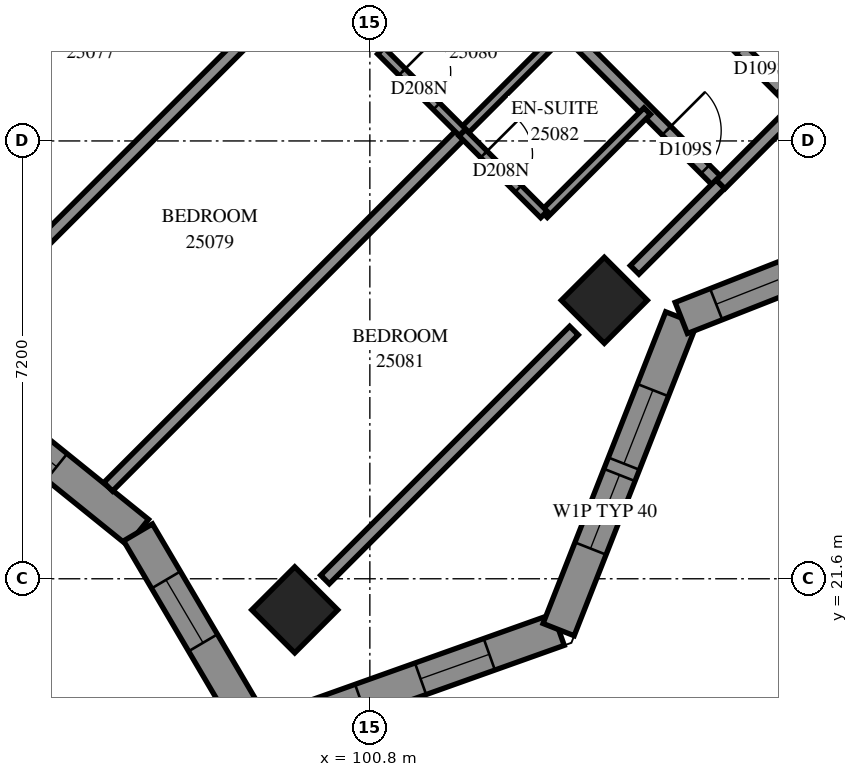
"""IFC4 building model, lengths in metres.
Left out: names, types, materials, properties, quantities, classifications, styles, units other than length and angle.
Written with IfcOpenShell. Run it as: python <this file> out.ifc"""

import sys

from ifc_helpers import new_model, si_unit, direction, frame, frame_2d, origin, origin_2d, place, context, subcontext, project, spatial, polyline, rectangle, outline, extrude, element, fill, save


model = new_model("IFC4")
c1 = context("Model", 3, precision=1e-05, world=origin(), true_north=direction((0.0, 1.0)))
c2 = subcontext(c1, "Body", "Model", "MODEL_VIEW")
j1 = project(units=[si_unit("LENGTHUNIT", "METRE"), si_unit("PLANEANGLEUNIT", "RADIAN")], contexts=[c1])
p1 = place(None, origin())
s1 = spatial("IfcSite", under=j1, at=p1, CompositionType="ELEMENT")
p2 = place(p1, origin())
s2 = spatial("IfcBuilding", under=s1, at=p2, CompositionType="ELEMENT")
p3 = place(p2, frame((0.0, 0.0, 94.8)))
s3 = spatial("IfcBuildingStorey", under=s2, at=p3, CompositionType="ELEMENT", Elevation=94.8)
for number, where, z_axis, x_axis in (
    (1, (104.656, 26.18, 0.0), (0.0, 0.0, 1.0), (0.707, -0.707, 0.0)),
    (2, (99.565, 21.088, 0.0), (0.0, 0.0, 1.0), (0.707, -0.707, 0.0)),
):
    element("IfcColumn", number, at=place(p3, frame(where, z_axis=z_axis, x_axis=x_axis)), inside=s3, PredefinedType="COLUMN", context=c2, shape_type="SweptSolid", body=[
        extrude(rectangle(XDim=1.0, YDim=1.0, at=origin_2d()), origin(), (0.0, 0.0, 1.0), 3.1),
    ])
p4 = place(p3, frame((98.965, 19.005, 0.0), z_axis=(0.0, 0.0, 1.0), x_axis=(0.9420323594, 0.3355220319, 0.0)))
e3 = element("IfcWall", 3, at=p4, inside=s3, PredefinedType="SOLIDWALL", context=c2, shape_type="SweptSolid", body=[
    extrude(outline(polyline([(-0.227, -0.275), (5.369, -0.275), (5.119, 0.275), (0.227, 0.275), (-0.227, -0.275)])), origin(), (0.0, 0.0, 1.0), 3.1),
])
p5 = place(p4, frame((0.588, 0.0, 0.5)))
e4 = element("IfcOpeningElement", 4, at=p5, cuts=e3, PredefinedType="OPENING", context=c2, shape_type="SweptSolid", body=[
    extrude(rectangle(XDim=1.2, YDim=2.45, at=frame_2d((0.6, 1.225))), frame((0.0, 0.285, 0.0), z_axis=(0.0, -1.0, 0.0), x_axis=(1.0, 0.0, 0.0)), (0.0, 0.0, 1.0), 0.57),
])
p6 = place(p4, frame((2.834, 0.0, 0.5)))
e5 = element("IfcOpeningElement", 5, at=p6, cuts=e3, PredefinedType="OPENING", context=c2, shape_type="SweptSolid", body=[
    extrude(rectangle(XDim=1.2, YDim=2.45, at=frame_2d((0.6, 1.225))), frame((0.0, 0.285, 0.0), z_axis=(0.0, -1.0, 0.0), x_axis=(1.0, 0.0, 0.0)), (0.0, 0.0, 1.0), 0.57),
])
p7 = place(p3, frame((103.904, 20.764, 0.0), z_axis=(0.0, 0.0, 1.0), x_axis=(0.3662073004, 0.930533295, 0.0)))
e6 = element("IfcWall", 6, at=p7, inside=s3, PredefinedType="SOLIDWALL", context=c2, shape_type="SweptSolid", body=[
    extrude(outline(polyline([(-0.125, -0.275), (5.388, -0.275), (5.628, 0.275), (0.125, 0.275), (-0.125, -0.275)])), origin(), (0.0, 0.0, 1.0), 3.1),
])
p8 = place(p7, frame((1.433, 0.0, 0.5)))
e7 = element("IfcOpeningElement", 7, at=p8, cuts=e6, PredefinedType="OPENING", context=c2, shape_type="SweptSolid", body=[
    extrude(rectangle(XDim=1.3, YDim=2.45, at=frame_2d((0.65, 1.225))), frame((0.0, 0.285, 0.0), z_axis=(0.0, -1.0, 0.0), x_axis=(1.0, 0.0, 0.0)), (0.0, 0.0, 1.0), 0.57),
])
p9 = place(p7, frame((2.933, 0.0, 0.5)))
e8 = element("IfcOpeningElement", 8, at=p9, cuts=e6, PredefinedType="OPENING", context=c2, shape_type="SweptSolid", body=[
    extrude(rectangle(XDim=1.3, YDim=2.45, at=frame_2d((0.65, 1.225))), frame((0.0, 0.285, 0.0), z_axis=(0.0, -1.0, 0.0), x_axis=(1.0, 0.0, 0.0)), (0.0, 0.0, 1.0), 0.57),
])
p10 = place(p3, frame((105.921, 25.889, 0.0), z_axis=(0.0, 0.0, 1.0), x_axis=(0.9305394819, 0.3661915791, 0.0)))
e9 = element("IfcWall", 9, at=p10, inside=s3, PredefinedType="SOLIDWALL", context=c2, shape_type="SweptSolid", body=[
    extrude(outline(polyline([(0.12, -0.275), (5.633, -0.275), (5.383, 0.275), (-0.12, 0.275), (0.12, -0.275)])), origin(), (0.0, 0.0, 1.0), 3.1),
])
p11 = place(p10, frame((0.617, 0.0, 0.5)))
e10 = element("IfcOpeningElement", 10, at=p11, cuts=e9, PredefinedType="OPENING", context=c2, shape_type="SweptSolid", body=[
    extrude(rectangle(XDim=1.2, YDim=2.45, at=frame_2d((0.6, 1.225))), frame((0.0, 0.285, 0.0), z_axis=(0.0, -1.0, 0.0), x_axis=(1.0, 0.0, 0.0)), (0.0, 0.0, 1.0), 0.57),
])
p12 = place(p10, frame((3.108, 0.0, 0.5)))
e11 = element("IfcOpeningElement", 11, at=p12, cuts=e9, PredefinedType="OPENING", context=c2, shape_type="SweptSolid", body=[
    extrude(rectangle(XDim=1.2, YDim=2.45, at=frame_2d((0.6, 1.225))), frame((0.0, 0.285, 0.0), z_axis=(0.0, -1.0, 0.0), x_axis=(1.0, 0.0, 0.0)), (0.0, 0.0, 1.0), 0.57),
])
p13 = place(p3, frame((93.885, 24.867, 0.0), z_axis=(0.0, 0.0, 1.0), x_axis=(0.7781698309, -0.6280539103, 0.0)))
e12 = element("IfcWall", 12, at=p13, inside=s3, PredefinedType="SOLIDWALL", context=c2, shape_type="SweptSolid", body=[
    extrude(outline(polyline([(-0.029, -0.275), (3.937, -0.275), (4.037, 0.275), (0.029, 0.275), (-0.029, -0.275)])), origin(), (0.0, 0.0, 1.0), 3.1),
])
p14 = place(p13, frame((1.067, 0.0, 0.5)))
e13 = element("IfcOpeningElement", 13, at=p14, cuts=e12, PredefinedType="OPENING", context=c2, shape_type="SweptSolid", body=[
    extrude(rectangle(XDim=1.2, YDim=2.45, at=frame_2d((0.6, 1.225))), frame((0.0, 0.285, 0.0), z_axis=(0.0, -1.0, 0.0), x_axis=(1.0, 0.0, 0.0)), (0.0, 0.0, 1.0), 0.57),
])
p15 = place(p3, frame((96.988, 22.363, 0.0), z_axis=(0.0, 0.0, 1.0), x_axis=(0.507326266, -0.86175406, 0.0)))
e14 = element("IfcWall", 14, at=p15, inside=s3, PredefinedType="SOLIDWALL", context=c2, shape_type="SweptSolid", body=[
    extrude(outline(polyline([(0.05, -0.275), (4.124, -0.275), (3.67, 0.275), (-0.05, 0.275), (0.05, -0.275)])), origin(), (0.0, 0.0, 1.0), 3.1),
])
p16 = place(p15, frame((0.907, 0.0, 0.5)))
e15 = element("IfcOpeningElement", 15, at=p16, cuts=e14, PredefinedType="OPENING", context=c2, shape_type="SweptSolid", body=[
    extrude(rectangle(XDim=1.2, YDim=2.45, at=frame_2d((0.6, 1.225))), frame((0.0, 0.285, 0.0), z_axis=(0.0, -1.0, 0.0), x_axis=(1.0, 0.0, 0.0)), (0.0, 0.0, 1.0), 0.57),
])
p17 = place(p3, frame((93.339, 41.309, 0.0), z_axis=(0.0, 0.0, 1.0), x_axis=(0.7071067812, -0.7071067812, 0.0)))
e16 = element("IfcWall", 16, at=p17, inside=s3, PredefinedType="PARTITIONING", context=c2, shape_type="SweptSolid", body=[
    extrude(rectangle(XDim=18.702, YDim=0.2, at=frame_2d((9.351, 0.0))), origin(), (0.0, 0.0, 1.0), 3.1),
])
p18 = place(p17, frame((3.05, 0.0, 0.0)))
e17 = element("IfcOpeningElement", 17, at=p18, cuts=e16, PredefinedType="OPENING", context=c2, shape_type="SweptSolid", body=[
    extrude(rectangle(XDim=0.9, YDim=2.1, at=frame_2d((0.45, 1.05))), frame((0.0, 0.11, 0.0), z_axis=(0.0, -1.0, 0.0), x_axis=(1.0, 0.0, 0.0)), (0.0, 0.0, 1.0), 0.22),
])
p19 = place(p17, frame((4.7, 0.0, 0.0)))
e18 = element("IfcOpeningElement", 18, at=p19, cuts=e16, PredefinedType="OPENING", context=c2, shape_type="SweptSolid", body=[
    extrude(rectangle(XDim=0.9, YDim=2.1, at=frame_2d((0.45, 1.05))), frame((0.0, 0.11, 0.0), z_axis=(0.0, -1.0, 0.0), x_axis=(1.0, 0.0, 0.0)), (0.0, 0.0, 1.0), 0.22),
])
p20 = place(p17, frame((10.149, 0.0, 0.0)))
e19 = element("IfcOpeningElement", 19, at=p20, cuts=e16, PredefinedType="OPENING", context=c2, shape_type="SweptSolid", body=[
    extrude(rectangle(XDim=0.9, YDim=2.1, at=frame_2d((0.45, 1.05))), frame((0.0, 0.11, 0.0), z_axis=(0.0, -1.0, 0.0), x_axis=(1.0, 0.0, 0.0)), (0.0, 0.0, 1.0), 0.22),
])
p21 = place(p17, frame((11.9, 0.0, 0.0)))
e20 = element("IfcOpeningElement", 20, at=p21, cuts=e16, PredefinedType="OPENING", context=c2, shape_type="SweptSolid", body=[
    extrude(rectangle(XDim=0.9, YDim=2.1, at=frame_2d((0.45, 1.05))), frame((0.0, 0.11, 0.0), z_axis=(0.0, -1.0, 0.0), x_axis=(1.0, 0.0, 0.0)), (0.0, 0.0, 1.0), 0.22),
])
p22 = place(p17, frame((17.45, 0.0, 0.0)))
e21 = element("IfcOpeningElement", 21, at=p22, cuts=e16, PredefinedType="OPENING", context=c2, shape_type="SweptSolid", body=[
    extrude(rectangle(XDim=0.9, YDim=2.1, at=frame_2d((0.45, 1.05))), frame((0.0, 0.11, 0.0), z_axis=(0.0, -1.0, 0.0), x_axis=(1.0, 0.0, 0.0)), (0.0, 0.0, 1.0), 0.22),
])
p23 = place(p3, frame((96.496, 23.113, 0.0), z_axis=(0.0, 0.0, 1.0), x_axis=(0.7071067812, 0.7071067812, 0.0)))
e22 = element("IfcWall", 22, at=p23, inside=s3, PredefinedType="PARTITIONING", context=c2, shape_type="SweptSolid", body=[
    extrude(rectangle(XDim=8.24, YDim=0.2, at=frame_2d((4.12, 0.0))), origin(), (0.0, 0.0, 1.0), 3.1),
])
p24 = place(p3, frame((91.461, 28.253, 0.0), z_axis=(0.0, 0.0, 1.0), x_axis=(0.7072231255, 0.7069904178, 0.0)))
e23 = element("IfcWall", 23, at=p24, inside=s3, PredefinedType="PARTITIONING", context=c2, shape_type="SweptSolid", body=[
    extrude(rectangle(XDim=8.165, YDim=0.2, at=frame_2d((4.082, 0.0))), origin(), (0.0, 0.0, 1.0), 3.1),
])
p25 = place(p3, frame((100.062, 21.588, 0.0), z_axis=(0.0, 0.0, 1.0), x_axis=(0.7071067812, 0.7071067812, 0.0)))
e24 = element("IfcWall", 24, at=p25, inside=s3, PredefinedType="PARTITIONING", context=c2, shape_type="SweptSolid", body=[
    extrude(rectangle(XDim=5.79, YDim=0.2, at=frame_2d((2.895, 0.0))), origin(), (0.0, 0.0, 1.0), 2.6),
])
p26 = place(p3, frame((94.973, 26.681, 0.0), z_axis=(0.0, 0.0, 1.0), x_axis=(0.7071067812, 0.7071067812, 0.0)))
e25 = element("IfcWall", 25, at=p26, inside=s3, PredefinedType="PARTITIONING", context=c2, shape_type="SweptSolid", body=[
    extrude(rectangle(XDim=5.784, YDim=0.2, at=frame_2d((2.892, 0.0))), origin(), (0.0, 0.0, 1.0), 3.1),
])
p27 = place(p3, frame((104.023, 33.184, 0.0), z_axis=(0.0, 0.0, 1.0), x_axis=(0.7071067812, -0.7071067812, 0.0)))
e26 = element("IfcWall", 26, at=p27, inside=s3, PredefinedType="PARTITIONING", context=c2, shape_type="SweptSolid", body=[
    extrude(rectangle(XDim=5.399, YDim=0.2, at=frame_2d((2.7, 0.0))), origin(), (0.0, 0.0, 1.0), 3.1),
])
p28 = place(p27, frame((4.08, 0.0, 0.0)))
e27 = element("IfcOpeningElement", 27, at=p28, cuts=e26, PredefinedType="OPENING", context=c2, shape_type="SweptSolid", body=[
    extrude(rectangle(XDim=0.9, YDim=2.1, at=frame_2d((0.45, 1.05))), frame((0.0, 0.11, 0.0), z_axis=(0.0, -1.0, 0.0), x_axis=(1.0, 0.0, 0.0)), (0.0, 0.0, 1.0), 0.22),
])
p29 = place(p3, frame((100.977, 30.281, 0.0), z_axis=(0.0, 0.0, 1.0), x_axis=(0.7071067812, 0.7071067812, 0.0)))
e28 = element("IfcWall", 28, at=p29, inside=s3, PredefinedType="PARTITIONING", context=c2, shape_type="SweptSolid", body=[
    extrude(rectangle(XDim=2.401, YDim=0.15, at=frame_2d((1.201, 0.0))), origin(), (0.0, 0.0, 1.0), 3.1),
])
for number, where, z_axis, x_axis in (
    (29, (102.323, 28.939, 0.0), (0.0, 0.0, 1.0), (0.707, 0.707, 0.0)),
    (30, (103.665, 27.595, 0.0), (0.0, 0.0, 1.0), (0.707, 0.707, 0.0)),
):
    element("IfcWall", number, at=place(p3, frame(where, z_axis=z_axis, x_axis=x_axis)), inside=s3, PredefinedType="PARTITIONING", context=c2, shape_type="SweptSolid", body=[
        extrude(rectangle(XDim=2.398, YDim=0.15, at=frame_2d((1.199, 0.0))), origin(), (0.0, 0.0, 1.0), 3.1),
    ])
p30 = place(p3, frame((105.154, 26.68, 0.0), z_axis=(0.0, 0.0, 1.0), x_axis=(0.7071067812, 0.7071067812, 0.0)))
e31 = element("IfcWall", 31, at=p30, inside=s3, PredefinedType="PARTITIONING", context=c2, shape_type="SweptSolid", body=[
    extrude(rectangle(XDim=1.994, YDim=0.2, at=frame_2d((0.997, 0.0))), origin(), (0.0, 0.0, 1.0), 2.6),
])
p31 = place(p3, frame((100.981, 30.283, 0.0), z_axis=(0.0, 0.0, 1.0), x_axis=(0.7076330979, -0.7065800724, 0.0)))
e32 = element("IfcWall", 32, at=p31, inside=s3, PredefinedType="PARTITIONING", context=c2, shape_type="SweptSolid", body=[
    extrude(rectangle(XDim=1.899, YDim=0.15, at=frame_2d((0.95, 0.0))), origin(), (0.0, 0.0, 1.0), 3.1),
])
p32 = place(p31, frame((0.493, 0.0, 0.0)))
e33 = element("IfcOpeningElement", 33, at=p32, cuts=e32, PredefinedType="OPENING", context=c2, shape_type="SweptSolid", body=[
    extrude(rectangle(XDim=0.8, YDim=2.1, at=frame_2d((0.4, 1.05))), frame((0.0, 0.085, 0.0), z_axis=(0.0, -1.0, 0.0), x_axis=(1.0, 0.0, 0.0)), (0.0, 0.0, 1.0), 0.17),
])
p33 = place(p3, frame((102.321, 28.935, 0.0), z_axis=(0.0, 0.0, 1.0), x_axis=(0.7065800724, -0.7076330979, 0.0)))
e34 = element("IfcWall", 34, at=p33, inside=s3, PredefinedType="PARTITIONING", context=c2, shape_type="SweptSolid", body=[
    extrude(rectangle(XDim=1.899, YDim=0.15, at=frame_2d((0.95, 0.0))), origin(), (0.0, 0.0, 1.0), 3.1),
])
p34 = place(p33, frame((0.501, 0.0, 0.0)))
e35 = element("IfcOpeningElement", 35, at=p34, cuts=e34, PredefinedType="OPENING", context=c2, shape_type="SweptSolid", body=[
    extrude(rectangle(XDim=0.8, YDim=2.1, at=frame_2d((0.4, 1.05))), frame((0.0, 0.085, 0.0), z_axis=(0.0, -1.0, 0.0), x_axis=(1.0, 0.0, 0.0)), (0.0, 0.0, 1.0), 0.17),
])
p35 = place(p3, frame((106.568, 28.086, 0.0), z_axis=(0.0, 0.0, 1.0), x_axis=(0.7065510983, 0.7076620277, 0.0)))
e36 = element("IfcWall", 36, at=p35, inside=s3, PredefinedType="PARTITIONING", context=c2, shape_type="SweptSolid", body=[
    extrude(rectangle(XDim=1.8, YDim=0.2, at=frame_2d((0.9, 0.0))), origin(), (0.0, 0.0, 1.0), 2.6),
])
p36 = place(p5, origin())
e37 = element("IfcWindow", 37, at=p36, inside=s3, PartitioningType="SINGLE_PANEL", PredefinedType="WINDOW", context=c2, shape_type="SweptSolid", body=[
    extrude(rectangle(XDim=1.2, YDim=2.45, at=frame_2d((0.6, 1.225))), frame((0.0, 0.155, 0.0), z_axis=(0.0, -1.0, 0.0), x_axis=(1.0, 0.0, 0.0)), (0.0, 0.0, 1.0), 0.06),
])
fill(e4, e37)
p37 = place(p6, origin())
e38 = element("IfcWindow", 38, at=p37, inside=s3, PartitioningType="SINGLE_PANEL", PredefinedType="WINDOW", context=c2, shape_type="SweptSolid", body=[
    extrude(rectangle(XDim=1.2, YDim=2.45, at=frame_2d((0.6, 1.225))), frame((0.0, 0.155, 0.0), z_axis=(0.0, -1.0, 0.0), x_axis=(1.0, 0.0, 0.0)), (0.0, 0.0, 1.0), 0.06),
])
fill(e5, e38)
p38 = place(p8, origin())
e39 = element("IfcWindow", 39, at=p38, inside=s3, PartitioningType="SINGLE_PANEL", PredefinedType="WINDOW", context=c2, shape_type="SweptSolid", body=[
    extrude(rectangle(XDim=1.3, YDim=2.45, at=frame_2d((0.65, 1.225))), frame((0.0, 0.155, 0.0), z_axis=(0.0, -1.0, 0.0), x_axis=(1.0, 0.0, 0.0)), (0.0, 0.0, 1.0), 0.06),
])
fill(e7, e39)
p39 = place(p9, origin())
e40 = element("IfcWindow", 40, at=p39, inside=s3, PartitioningType="SINGLE_PANEL", PredefinedType="WINDOW", context=c2, shape_type="SweptSolid", body=[
    extrude(rectangle(XDim=1.3, YDim=2.45, at=frame_2d((0.65, 1.225))), frame((0.0, 0.155, 0.0), z_axis=(0.0, -1.0, 0.0), x_axis=(1.0, 0.0, 0.0)), (0.0, 0.0, 1.0), 0.06),
])
fill(e8, e40)
p40 = place(p11, origin())
e41 = element("IfcWindow", 41, at=p40, inside=s3, PartitioningType="SINGLE_PANEL", PredefinedType="WINDOW", context=c2, shape_type="SweptSolid", body=[
    extrude(rectangle(XDim=1.2, YDim=2.45, at=frame_2d((0.6, 1.225))), frame((0.0, 0.155, 0.0), z_axis=(0.0, -1.0, 0.0), x_axis=(1.0, 0.0, 0.0)), (0.0, 0.0, 1.0), 0.06),
])
fill(e10, e41)
p41 = place(p14, origin())
e42 = element("IfcWindow", 42, at=p41, inside=s3, PartitioningType="SINGLE_PANEL", PredefinedType="WINDOW", context=c2, shape_type="SweptSolid", body=[
    extrude(rectangle(XDim=1.2, YDim=2.45, at=frame_2d((0.6, 1.225))), frame((0.0, 0.155, 0.0), z_axis=(0.0, -1.0, 0.0), x_axis=(1.0, 0.0, 0.0)), (0.0, 0.0, 1.0), 0.06),
])
fill(e13, e42)
p42 = place(p16, origin())
e43 = element("IfcWindow", 43, at=p42, inside=s3, PartitioningType="SINGLE_PANEL", PredefinedType="WINDOW", context=c2, shape_type="SweptSolid", body=[
    extrude(rectangle(XDim=1.2, YDim=2.45, at=frame_2d((0.6, 1.225))), frame((0.0, 0.155, 0.0), z_axis=(0.0, -1.0, 0.0), x_axis=(1.0, 0.0, 0.0)), (0.0, 0.0, 1.0), 0.06),
])
fill(e15, e43)
p43 = place(p32, origin())
e44 = element("IfcDoor", 44, at=p43, inside=s3, OperationType="SINGLE_SWING_RIGHT", PredefinedType="DOOR", context=c2, shape_type="SweptSolid", body=[
    extrude(rectangle(XDim=0.8, YDim=2.1, at=frame_2d((0.4, 1.05))), frame((0.0, 0.025, 0.0), z_axis=(0.0, -1.0, 0.0), x_axis=(1.0, 0.0, 0.0)), (0.0, 0.0, 1.0), 0.05),
])
fill(e33, e44)
p44 = place(p22, origin())
e45 = element("IfcDoor", 45, at=p44, inside=s3, OperationType="SINGLE_SWING_LEFT", PredefinedType="DOOR", context=c2, shape_type="SweptSolid", body=[
    extrude(rectangle(XDim=0.9, YDim=2.1, at=frame_2d((0.45, 1.05))), frame((0.0, 0.025, 0.0), z_axis=(0.0, -1.0, 0.0), x_axis=(1.0, 0.0, 0.0)), (0.0, 0.0, 1.0), 0.05),
])
fill(e21, e45)
p45 = place(p34, origin())
e46 = element("IfcDoor", 46, at=p45, inside=s3, OperationType="SINGLE_SWING_RIGHT", PredefinedType="DOOR", context=c2, shape_type="SweptSolid", body=[
    extrude(rectangle(XDim=0.8, YDim=2.1, at=frame_2d((0.4, 1.05))), frame((0.0, 0.025, 0.0), z_axis=(0.0, -1.0, 0.0), x_axis=(1.0, 0.0, 0.0)), (0.0, 0.0, 1.0), 0.05),
])
fill(e35, e46)
p46 = place(p28, origin())
e47 = element("IfcDoor", 47, at=p46, inside=s3, OperationType="SINGLE_SWING_RIGHT", PredefinedType="DOOR", context=c2, shape_type="SweptSolid", body=[
    extrude(rectangle(XDim=0.9, YDim=2.1, at=frame_2d((0.45, 1.05))), frame((0.0, 0.025, 0.0), z_axis=(0.0, -1.0, 0.0), x_axis=(1.0, 0.0, 0.0)), (0.0, 0.0, 1.0), 0.05),
])
fill(e27, e47)
save(model, sys.argv[1])
